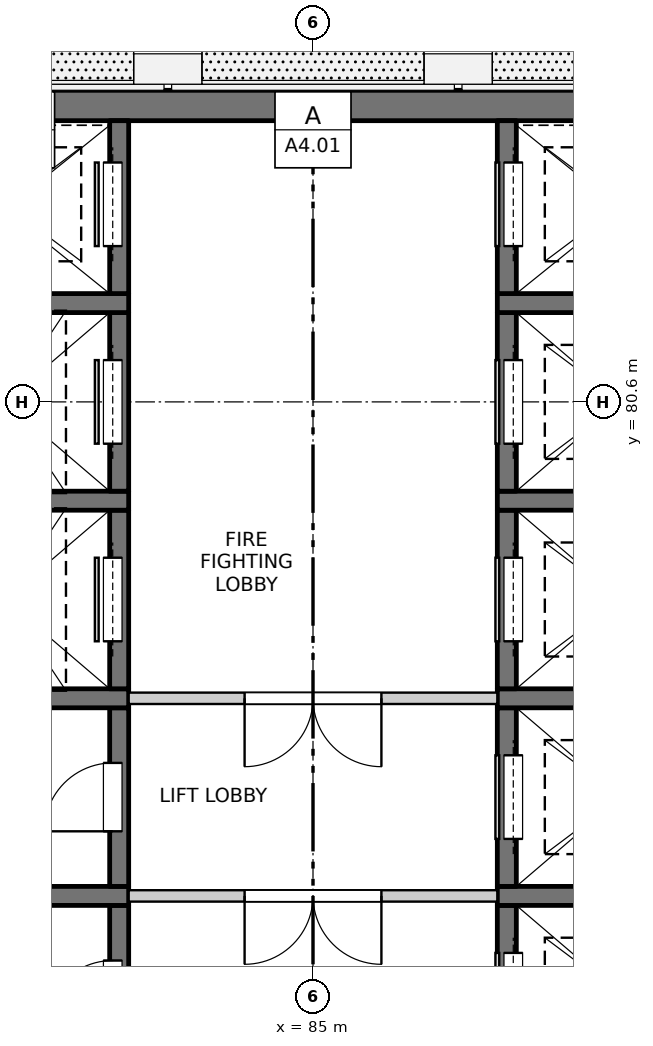
"""IFC4 building model, lengths in metres.
Left out: names, types, materials, properties, quantities, classifications, styles, units other than length and angle.
Written with IfcOpenShell. Run it as: python <this file> out.ifc"""

import sys

from ifc_helpers import new_model, si_unit, direction, frame, frame_2d, origin, place, context, subcontext, project, spatial, rectangle, extrude, element, fill, save


model = new_model("IFC4")
c1 = context("Model", 3, precision=1e-05, world=origin(), true_north=direction((0.0, 1.0)))
c2 = subcontext(c1, "Body", "Model", "MODEL_VIEW")
j1 = project(units=[si_unit("LENGTHUNIT", "METRE"), si_unit("PLANEANGLEUNIT", "RADIAN")], contexts=[c1])
p1 = place(None, origin())
s1 = spatial("IfcSite", under=j1, at=p1, CompositionType="ELEMENT")
p2 = place(p1, origin())
s2 = spatial("IfcBuilding", under=s1, at=p2, CompositionType="ELEMENT")
p3 = place(p2, frame((0.0, 0.0, 249.4)))
s3 = spatial("IfcBuildingStorey", under=s2, at=p3, CompositionType="ELEMENT", Elevation=249.4)
p4 = place(p3, frame((75.45, 84.5, -0.25), z_axis=(0.0, 0.0, 1.0), x_axis=(1.0, 0.0, 0.0)))
e1 = element("IfcWall", 1, at=p4, inside=s3, PredefinedType="SOLIDWALL", context=c2, shape_type="SweptSolid", body=[
    extrude(rectangle(XDim=19.1, YDim=0.4, at=frame_2d((9.55, 0.0))), origin(), (0.0, 0.0, 1.0), 3.4),
])
p5 = place(p3, frame((82.45, 71.625, -0.25), z_axis=(0.0, 0.0, 1.0), x_axis=(0.0, 1.0, 0.0)))
e2 = element("IfcWall", 2, at=p5, inside=s3, PredefinedType="SOLIDWALL", context=c2, shape_type="SweptSolid", body=[
    extrude(rectangle(XDim=2.35, YDim=0.25, at=frame_2d((1.175, 0.0))), origin(), (0.0, 0.0, 1.0), 3.4),
])
p6 = place(p5, frame((0.725, 0.0, 0.25)))
e3 = element("IfcOpeningElement", 3, at=p6, cuts=e2, PredefinedType="OPENING", context=c2, shape_type="SweptSolid", body=[
    extrude(rectangle(XDim=0.9, YDim=2.1, at=frame_2d((0.45, 1.05))), frame((0.0, 0.135, 0.0), z_axis=(0.0, -1.0, 0.0), x_axis=(1.0, 0.0, 0.0)), (0.0, 0.0, 1.0), 0.27),
])
p7 = place(p3, frame((79.575, 74.1, -0.25), z_axis=(0.0, 0.0, 1.0), x_axis=(1.0, 0.0, 0.0)))
e4 = element("IfcWall", 4, at=p7, inside=s3, PredefinedType="SOLIDWALL", context=c2, shape_type="SweptSolid", body=[
    extrude(rectangle(XDim=3.0, YDim=0.25, at=frame_2d((1.5, 0.0))), origin(), (0.0, 0.0, 1.0), 3.4),
])
p8 = place(p3, frame((82.45, 74.225, -0.25), z_axis=(0.0, 0.0, 1.0), x_axis=(0.0, 1.0, 0.0)))
e5 = element("IfcWall", 5, at=p8, inside=s3, PredefinedType="SOLIDWALL", context=c2, shape_type="SweptSolid", body=[
    extrude(rectangle(XDim=2.35, YDim=0.25, at=frame_2d((1.175, 0.0))), origin(), (0.0, 0.0, 1.0), 3.4),
])
p9 = place(p8, frame((0.725, 0.0, 0.25)))
e6 = element("IfcOpeningElement", 6, at=p9, cuts=e5, PredefinedType="OPENING", context=c2, shape_type="SweptSolid", body=[
    extrude(rectangle(XDim=0.9, YDim=2.1, at=frame_2d((0.45, 1.05))), frame((0.0, 0.135, 0.0), z_axis=(0.0, -1.0, 0.0), x_axis=(1.0, 0.0, 0.0)), (0.0, 0.0, 1.0), 0.27),
])
p10 = place(p3, frame((79.575, 76.7, -0.25), z_axis=(0.0, 0.0, 1.0), x_axis=(1.0, 0.0, 0.0)))
e7 = element("IfcWall", 7, at=p10, inside=s3, PredefinedType="SOLIDWALL", context=c2, shape_type="SweptSolid", body=[
    extrude(rectangle(XDim=3.0, YDim=0.25, at=frame_2d((1.5, 0.0))), origin(), (0.0, 0.0, 1.0), 3.4),
])
p11 = place(p3, frame((82.45, 76.825, -0.25), z_axis=(0.0, 0.0, 1.0), x_axis=(0.0, 1.0, 0.0)))
e8 = element("IfcWall", 8, at=p11, inside=s3, PredefinedType="SOLIDWALL", context=c2, shape_type="SweptSolid", body=[
    extrude(rectangle(XDim=2.35, YDim=0.25, at=frame_2d((1.175, 0.0))), origin(), (0.0, 0.0, 1.0), 3.4),
])
p12 = place(p11, frame((0.625, 0.0, 0.25)))
e9 = element("IfcOpeningElement", 9, at=p12, cuts=e8, PredefinedType="OPENING", context=c2, shape_type="SweptSolid", body=[
    extrude(rectangle(XDim=1.1, YDim=2.1, at=frame_2d((0.55, 1.05))), frame((0.0, 0.135, 0.0), z_axis=(0.0, -1.0, 0.0), x_axis=(1.0, 0.0, 0.0)), (0.0, 0.0, 1.0), 0.27),
])
p13 = place(p3, frame((79.575, 79.3, -0.25), z_axis=(0.0, 0.0, 1.0), x_axis=(1.0, 0.0, 0.0)))
e10 = element("IfcWall", 10, at=p13, inside=s3, PredefinedType="SOLIDWALL", context=c2, shape_type="SweptSolid", body=[
    extrude(rectangle(XDim=3.0, YDim=0.25, at=frame_2d((1.5, 0.0))), origin(), (0.0, 0.0, 1.0), 3.4),
])
p14 = place(p3, frame((82.45, 79.425, -0.25), z_axis=(0.0, 0.0, 1.0), x_axis=(0.0, 1.0, 0.0)))
e11 = element("IfcWall", 11, at=p14, inside=s3, PredefinedType="SOLIDWALL", context=c2, shape_type="SweptSolid", body=[
    extrude(rectangle(XDim=2.35, YDim=0.25, at=frame_2d((1.175, 0.0))), origin(), (0.0, 0.0, 1.0), 3.4),
])
p15 = place(p14, frame((0.625, 0.0, 0.25)))
e12 = element("IfcOpeningElement", 12, at=p15, cuts=e11, PredefinedType="OPENING", context=c2, shape_type="SweptSolid", body=[
    extrude(rectangle(XDim=1.1, YDim=2.1, at=frame_2d((0.55, 1.05))), frame((0.0, 0.135, 0.0), z_axis=(0.0, -1.0, 0.0), x_axis=(1.0, 0.0, 0.0)), (0.0, 0.0, 1.0), 0.27),
])
p16 = place(p3, frame((79.575, 81.9, -0.25), z_axis=(0.0, 0.0, 1.0), x_axis=(1.0, 0.0, 0.0)))
e13 = element("IfcWall", 13, at=p16, inside=s3, PredefinedType="SOLIDWALL", context=c2, shape_type="SweptSolid", body=[
    extrude(rectangle(XDim=3.0, YDim=0.25, at=frame_2d((1.5, 0.0))), origin(), (0.0, 0.0, 1.0), 3.4),
])
p17 = place(p3, frame((82.45, 82.025, -0.25), z_axis=(0.0, 0.0, 1.0), x_axis=(0.0, 1.0, 0.0)))
e14 = element("IfcWall", 14, at=p17, inside=s3, PredefinedType="SOLIDWALL", context=c2, shape_type="SweptSolid", body=[
    extrude(rectangle(XDim=2.275, YDim=0.25, at=frame_2d((1.138, 0.0))), origin(), (0.0, 0.0, 1.0), 3.4),
])
p18 = place(p17, frame((0.625, 0.0, 0.25)))
e15 = element("IfcOpeningElement", 15, at=p18, cuts=e14, PredefinedType="OPENING", context=c2, shape_type="SweptSolid", body=[
    extrude(rectangle(XDim=1.1, YDim=2.1, at=frame_2d((0.55, 1.05))), frame((0.0, 0.135, 0.0), z_axis=(0.0, -1.0, 0.0), x_axis=(1.0, 0.0, 0.0)), (0.0, 0.0, 1.0), 0.27),
])
p19 = place(p3, frame((87.55, 71.625, -0.25), z_axis=(0.0, 0.0, 1.0), x_axis=(0.0, 1.0, 0.0)))
e16 = element("IfcWall", 16, at=p19, inside=s3, PredefinedType="SOLIDWALL", context=c2, shape_type="SweptSolid", body=[
    extrude(rectangle(XDim=2.35, YDim=0.25, at=frame_2d((1.175, 0.0))), origin(), (0.0, 0.0, 1.0), 3.4),
])
p20 = place(p19, frame((0.625, 0.0, 0.25)))
e17 = element("IfcOpeningElement", 17, at=p20, cuts=e16, PredefinedType="OPENING", context=c2, shape_type="SweptSolid", body=[
    extrude(rectangle(XDim=1.1, YDim=2.1, at=frame_2d((0.55, 1.05))), frame((0.0, 0.135, 0.0), z_axis=(0.0, -1.0, 0.0), x_axis=(1.0, 0.0, 0.0)), (0.0, 0.0, 1.0), 0.27),
])
p21 = place(p3, frame((87.425, 74.1, -0.25), z_axis=(0.0, 0.0, 1.0), x_axis=(1.0, 0.0, 0.0)))
e18 = element("IfcWall", 18, at=p21, inside=s3, PredefinedType="SOLIDWALL", context=c2, shape_type="SweptSolid", body=[
    extrude(rectangle(XDim=3.0, YDim=0.25, at=frame_2d((1.5, 0.0))), origin(), (0.0, 0.0, 1.0), 3.4),
])
p22 = place(p3, frame((87.55, 74.225, -0.25), z_axis=(0.0, 0.0, 1.0), x_axis=(0.0, 1.0, 0.0)))
e19 = element("IfcWall", 19, at=p22, inside=s3, PredefinedType="SOLIDWALL", context=c2, shape_type="SweptSolid", body=[
    extrude(rectangle(XDim=2.35, YDim=0.25, at=frame_2d((1.175, 0.0))), origin(), (0.0, 0.0, 1.0), 3.4),
])
p23 = place(p22, frame((0.625, 0.0, 0.25)))
e20 = element("IfcOpeningElement", 20, at=p23, cuts=e19, PredefinedType="OPENING", context=c2, shape_type="SweptSolid", body=[
    extrude(rectangle(XDim=1.1, YDim=2.1, at=frame_2d((0.55, 1.05))), frame((0.0, 0.135, 0.0), z_axis=(0.0, -1.0, 0.0), x_axis=(1.0, 0.0, 0.0)), (0.0, 0.0, 1.0), 0.27),
])
p24 = place(p3, frame((87.425, 76.7, -0.25), z_axis=(0.0, 0.0, 1.0), x_axis=(1.0, 0.0, 0.0)))
e21 = element("IfcWall", 21, at=p24, inside=s3, PredefinedType="SOLIDWALL", context=c2, shape_type="SweptSolid", body=[
    extrude(rectangle(XDim=3.0, YDim=0.25, at=frame_2d((1.5, 0.0))), origin(), (0.0, 0.0, 1.0), 3.4),
])
p25 = place(p3, frame((87.55, 76.825, -0.25), z_axis=(0.0, 0.0, 1.0), x_axis=(0.0, 1.0, 0.0)))
e22 = element("IfcWall", 22, at=p25, inside=s3, PredefinedType="SOLIDWALL", context=c2, shape_type="SweptSolid", body=[
    extrude(rectangle(XDim=2.35, YDim=0.25, at=frame_2d((1.175, 0.0))), origin(), (0.0, 0.0, 1.0), 3.4),
])
p26 = place(p25, frame((0.625, 0.0, 0.25)))
e23 = element("IfcOpeningElement", 23, at=p26, cuts=e22, PredefinedType="OPENING", context=c2, shape_type="SweptSolid", body=[
    extrude(rectangle(XDim=1.1, YDim=2.1, at=frame_2d((0.55, 1.05))), frame((0.0, 0.135, 0.0), z_axis=(0.0, -1.0, 0.0), x_axis=(1.0, 0.0, 0.0)), (0.0, 0.0, 1.0), 0.27),
])
p27 = place(p3, frame((87.425, 79.3, -0.25), z_axis=(0.0, 0.0, 1.0), x_axis=(1.0, 0.0, 0.0)))
e24 = element("IfcWall", 24, at=p27, inside=s3, PredefinedType="SOLIDWALL", context=c2, shape_type="SweptSolid", body=[
    extrude(rectangle(XDim=3.0, YDim=0.25, at=frame_2d((1.5, 0.0))), origin(), (0.0, 0.0, 1.0), 3.4),
])
p28 = place(p3, frame((87.55, 79.425, -0.25), z_axis=(0.0, 0.0, 1.0), x_axis=(0.0, 1.0, 0.0)))
e25 = element("IfcWall", 25, at=p28, inside=s3, PredefinedType="SOLIDWALL", context=c2, shape_type="SweptSolid", body=[
    extrude(rectangle(XDim=2.35, YDim=0.25, at=frame_2d((1.175, 0.0))), origin(), (0.0, 0.0, 1.0), 3.4),
])
p29 = place(p28, frame((0.625, 0.0, 0.25)))
e26 = element("IfcOpeningElement", 26, at=p29, cuts=e25, PredefinedType="OPENING", context=c2, shape_type="SweptSolid", body=[
    extrude(rectangle(XDim=1.1, YDim=2.1, at=frame_2d((0.55, 1.05))), frame((0.0, 0.135, 0.0), z_axis=(0.0, -1.0, 0.0), x_axis=(1.0, 0.0, 0.0)), (0.0, 0.0, 1.0), 0.27),
])
p30 = place(p3, frame((87.425, 81.9, -0.25), z_axis=(0.0, 0.0, 1.0), x_axis=(1.0, 0.0, 0.0)))
e27 = element("IfcWall", 27, at=p30, inside=s3, PredefinedType="SOLIDWALL", context=c2, shape_type="SweptSolid", body=[
    extrude(rectangle(XDim=3.0, YDim=0.25, at=frame_2d((1.5, 0.0))), origin(), (0.0, 0.0, 1.0), 3.4),
])
p31 = place(p3, frame((87.55, 82.025, -0.25), z_axis=(0.0, 0.0, 1.0), x_axis=(0.0, 1.0, 0.0)))
e28 = element("IfcWall", 28, at=p31, inside=s3, PredefinedType="SOLIDWALL", context=c2, shape_type="SweptSolid", body=[
    extrude(rectangle(XDim=2.275, YDim=0.25, at=frame_2d((1.138, 0.0))), origin(), (0.0, 0.0, 1.0), 3.4),
])
p32 = place(p31, frame((0.625, 0.0, 0.25)))
e29 = element("IfcOpeningElement", 29, at=p32, cuts=e28, PredefinedType="OPENING", context=c2, shape_type="SweptSolid", body=[
    extrude(rectangle(XDim=1.1, YDim=2.1, at=frame_2d((0.55, 1.05))), frame((0.0, 0.135, 0.0), z_axis=(0.0, -1.0, 0.0), x_axis=(1.0, 0.0, 0.0)), (0.0, 0.0, 1.0), 0.27),
])
p33 = place(p3, frame((82.575, 74.1, 0.0), z_axis=(0.0, 0.0, 1.0), x_axis=(1.0, 0.0, 0.0)))
e30 = element("IfcWall", 30, at=p33, inside=s3, PredefinedType="PARTITIONING", context=c2, shape_type="SweptSolid", body=[
    extrude(rectangle(XDim=4.85, YDim=0.15, at=frame_2d((2.425, 0.0))), origin(), (0.0, 0.0, 1.0), 3.15),
])
p34 = place(p33, frame((1.525, 0.0, 0.0)))
e31 = element("IfcOpeningElement", 31, at=p34, cuts=e30, PredefinedType="OPENING", context=c2, shape_type="SweptSolid", body=[
    extrude(rectangle(XDim=1.8, YDim=2.1, at=frame_2d((0.9, 1.05))), frame((0.0, 0.085, 0.0), z_axis=(0.0, -1.0, 0.0), x_axis=(1.0, 0.0, 0.0)), (0.0, 0.0, 1.0), 0.17),
])
p35 = place(p3, frame((82.575, 76.7, 0.0), z_axis=(0.0, 0.0, 1.0), x_axis=(1.0, 0.0, 0.0)))
e32 = element("IfcWall", 32, at=p35, inside=s3, PredefinedType="PARTITIONING", context=c2, shape_type="SweptSolid", body=[
    extrude(rectangle(XDim=4.85, YDim=0.15, at=frame_2d((2.425, 0.0))), origin(), (0.0, 0.0, 1.0), 3.15),
])
p36 = place(p35, frame((1.525, 0.0, 0.0)))
e33 = element("IfcOpeningElement", 33, at=p36, cuts=e32, PredefinedType="OPENING", context=c2, shape_type="SweptSolid", body=[
    extrude(rectangle(XDim=1.8, YDim=2.1, at=frame_2d((0.9, 1.05))), frame((0.0, 0.085, 0.0), z_axis=(0.0, -1.0, 0.0), x_axis=(1.0, 0.0, 0.0)), (0.0, 0.0, 1.0), 0.17),
])
p37 = place(p6, origin())
e34 = element("IfcDoor", 34, at=p37, inside=s3, OperationType="SINGLE_SWING_LEFT", PredefinedType="DOOR", context=c2, shape_type="SweptSolid", body=[
    extrude(rectangle(XDim=0.9, YDim=2.1, at=frame_2d((0.45, 1.05))), frame((0.0, 0.11, 0.0), z_axis=(0.0, -1.0, 0.0), x_axis=(1.0, 0.0, 0.0)), (0.0, 0.0, 1.0), 0.05),
])
fill(e3, e34)
p38 = place(p20, origin())
e35 = element("IfcDoor", 35, at=p38, inside=s3, OperationType="SLIDING_TO_LEFT", PredefinedType="DOOR", context=c2, shape_type="SweptSolid", body=[
    extrude(rectangle(XDim=1.1, YDim=2.1, at=frame_2d((0.55, 1.05))), frame((0.0, -0.06, 0.0), z_axis=(0.0, -1.0, 0.0), x_axis=(1.0, 0.0, 0.0)), (0.0, 0.0, 1.0), 0.05),
])
fill(e17, e35)
p39 = place(p34, origin())
e36 = element("IfcDoor", 36, at=p39, inside=s3, OperationType="DOUBLE_DOOR_SINGLE_SWING", PredefinedType="DOOR", context=c2, shape_type="SweptSolid", body=[
    extrude(rectangle(XDim=1.8, YDim=2.1, at=frame_2d((0.9, 1.05))), frame((0.0, 0.025, 0.0), z_axis=(0.0, -1.0, 0.0), x_axis=(1.0, 0.0, 0.0)), (0.0, 0.0, 1.0), 0.05),
])
fill(e31, e36)
p40 = place(p9, origin())
e37 = element("IfcDoor", 37, at=p40, inside=s3, OperationType="SINGLE_SWING_LEFT", PredefinedType="DOOR", context=c2, shape_type="SweptSolid", body=[
    extrude(rectangle(XDim=0.9, YDim=2.1, at=frame_2d((0.45, 1.05))), frame((0.0, 0.11, 0.0), z_axis=(0.0, -1.0, 0.0), x_axis=(1.0, 0.0, 0.0)), (0.0, 0.0, 1.0), 0.05),
])
fill(e6, e37)
p41 = place(p23, origin())
e38 = element("IfcDoor", 38, at=p41, inside=s3, OperationType="SLIDING_TO_LEFT", PredefinedType="DOOR", context=c2, shape_type="SweptSolid", body=[
    extrude(rectangle(XDim=1.1, YDim=2.1, at=frame_2d((0.55, 1.05))), frame((0.0, -0.06, 0.0), z_axis=(0.0, -1.0, 0.0), x_axis=(1.0, 0.0, 0.0)), (0.0, 0.0, 1.0), 0.05),
])
fill(e20, e38)
p42 = place(p36, origin())
e39 = element("IfcDoor", 39, at=p42, inside=s3, OperationType="DOUBLE_DOOR_SINGLE_SWING", PredefinedType="DOOR", context=c2, shape_type="SweptSolid", body=[
    extrude(rectangle(XDim=1.8, YDim=2.1, at=frame_2d((0.9, 1.05))), frame((0.0, 0.025, 0.0), z_axis=(0.0, -1.0, 0.0), x_axis=(1.0, 0.0, 0.0)), (0.0, 0.0, 1.0), 0.05),
])
fill(e33, e39)
p43 = place(p12, origin())
e40 = element("IfcDoor", 40, at=p43, inside=s3, OperationType="SLIDING_TO_LEFT", PredefinedType="DOOR", context=c2, shape_type="SweptSolid", body=[
    extrude(rectangle(XDim=1.1, YDim=2.1, at=frame_2d((0.55, 1.05))), frame((0.0, 0.11, 0.0), z_axis=(0.0, -1.0, 0.0), x_axis=(1.0, 0.0, 0.0)), (0.0, 0.0, 1.0), 0.05),
])
fill(e9, e40)
p44 = place(p26, origin())
e41 = element("IfcDoor", 41, at=p44, inside=s3, OperationType="SLIDING_TO_LEFT", PredefinedType="DOOR", context=c2, shape_type="SweptSolid", body=[
    extrude(rectangle(XDim=1.1, YDim=2.1, at=frame_2d((0.55, 1.05))), frame((0.0, -0.06, 0.0), z_axis=(0.0, -1.0, 0.0), x_axis=(1.0, 0.0, 0.0)), (0.0, 0.0, 1.0), 0.05),
])
fill(e23, e41)
p45 = place(p15, origin())
e42 = element("IfcDoor", 42, at=p45, inside=s3, OperationType="SLIDING_TO_LEFT", PredefinedType="DOOR", context=c2, shape_type="SweptSolid", body=[
    extrude(rectangle(XDim=1.1, YDim=2.1, at=frame_2d((0.55, 1.05))), frame((0.0, 0.11, 0.0), z_axis=(0.0, -1.0, 0.0), x_axis=(1.0, 0.0, 0.0)), (0.0, 0.0, 1.0), 0.05),
])
fill(e12, e42)
p46 = place(p29, origin())
e43 = element("IfcDoor", 43, at=p46, inside=s3, OperationType="SLIDING_TO_RIGHT", PredefinedType="DOOR", context=c2, shape_type="SweptSolid", body=[
    extrude(rectangle(XDim=1.1, YDim=2.1, at=frame_2d((0.55, 1.05))), frame((0.0, -0.06, 0.0), z_axis=(0.0, -1.0, 0.0), x_axis=(1.0, 0.0, 0.0)), (0.0, 0.0, 1.0), 0.05),
])
fill(e26, e43)
p47 = place(p18, origin())
e44 = element("IfcDoor", 44, at=p47, inside=s3, OperationType="SLIDING_TO_RIGHT", PredefinedType="DOOR", context=c2, shape_type="SweptSolid", body=[
    extrude(rectangle(XDim=1.1, YDim=2.1, at=frame_2d((0.55, 1.05))), frame((0.0, 0.11, 0.0), z_axis=(0.0, -1.0, 0.0), x_axis=(1.0, 0.0, 0.0)), (0.0, 0.0, 1.0), 0.05),
])
fill(e15, e44)
p48 = place(p32, origin())
e45 = element("IfcDoor", 45, at=p48, inside=s3, OperationType="SLIDING_TO_RIGHT", PredefinedType="DOOR", context=c2, shape_type="SweptSolid", body=[
    extrude(rectangle(XDim=1.1, YDim=2.1, at=frame_2d((0.55, 1.05))), frame((0.0, -0.06, 0.0), z_axis=(0.0, -1.0, 0.0), x_axis=(1.0, 0.0, 0.0)), (0.0, 0.0, 1.0), 0.05),
])
fill(e29, e45)
save(model, sys.argv[1])
